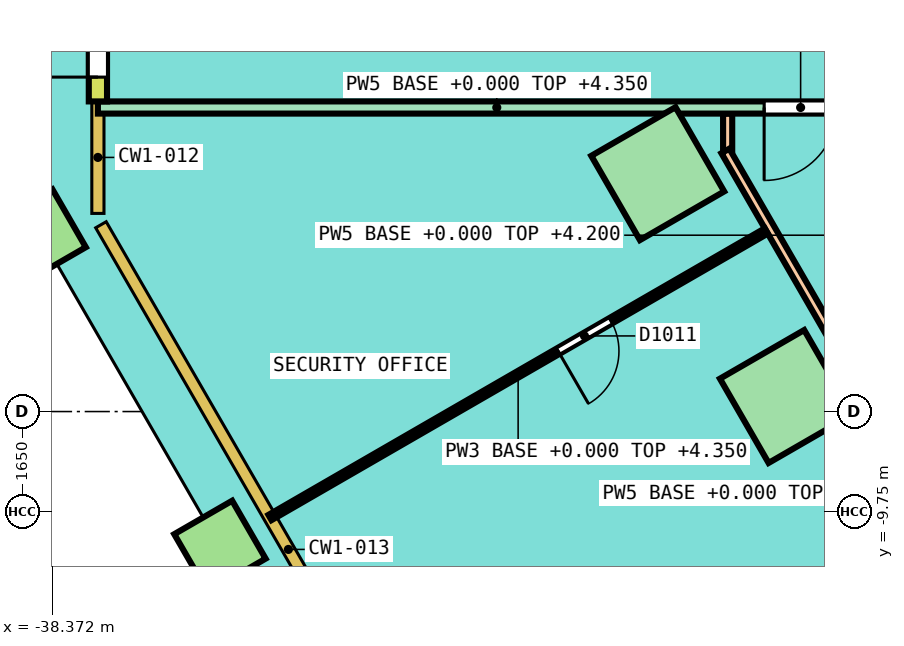
"""IFC4 building model, lengths in metres.
Left out: names, types, materials, properties, quantities, classifications, styles, units other than length and angle.
Written with IfcOpenShell. Run it as: python <this file> out.ifc"""

import sys

from ifc_helpers import new_model, si_unit, direction, frame, frame_2d, origin, origin_2d, place, context, subcontext, project, spatial, rectangle, extrude, element, fill, save


model = new_model("IFC4")
c1 = context("Model", 3, precision=1e-05, world=origin(), true_north=direction((0.0, 1.0)))
c2 = subcontext(c1, "Body", "Model", "MODEL_VIEW")
j1 = project(units=[si_unit("LENGTHUNIT", "METRE"), si_unit("PLANEANGLEUNIT", "RADIAN")], contexts=[c1])
p1 = place(None, origin())
s1 = spatial("IfcSite", under=j1, at=p1, CompositionType="ELEMENT")
p2 = place(p1, origin())
s2 = spatial("IfcBuilding", under=s1, at=p2, CompositionType="ELEMENT")
p3 = place(p2, origin())
s3 = spatial("IfcBuildingStorey", under=s2, at=p3, CompositionType="ELEMENT", Elevation=0.0)
for number, where, z_axis, x_axis in (
    (1, (-28.413, -4.188, 0.0), (0.0, 0.0, 1.0), (0.5, -0.866, 0.0)),
    (2, (-26.297, -7.853, 0.0), (0.0, 0.0, 1.0), (0.5, -0.866, 0.0)),
):
    element("IfcColumn", number, at=place(p3, frame(where, z_axis=z_axis, x_axis=x_axis)), inside=s3, PredefinedType="COLUMN", context=c2, shape_type="SweptSolid", body=[
        extrude(rectangle(XDim=1.6, YDim=1.6, at=origin_2d()), origin(), (0.0, 0.0, 1.0), 5.25),
    ])
for number, where, z_axis, x_axis in (
    (3, (-38.569, -5.196, -0.35), (0.0, 0.0, 1.0), (0.5, -0.866, 0.0)),
    (4, (-35.612, -10.318, -0.35), (0.0, 0.0, 1.0), (0.5, -0.866, 0.0)),
):
    element("IfcColumn", number, at=place(p3, frame(where, z_axis=z_axis, x_axis=x_axis)), inside=s3, PredefinedType="COLUMN", context=c2, shape_type="SweptSolid", body=[
        extrude(rectangle(XDim=1.1, YDim=1.1, at=origin_2d()), origin(), (0.0, 0.0, 1.0), 5.6),
    ])
p4 = place(p3, frame((-37.619, 3.0, 0.0), z_axis=(0.0, 0.0, 1.0), x_axis=(0.0, -1.0, 0.0)))
e5 = element("IfcWall", 5, at=p4, inside=s3, PredefinedType="SOLIDWALL", context=c2, shape_type="SweptSolid", body=[
    extrude(rectangle(XDim=6.0, YDim=0.3, at=frame_2d((3.0, 0.0))), origin(), (0.0, 0.0, 1.0), 5.25),
])
p5 = place(p4, frame((0.4, 0.0, 0.0)))
e6 = element("IfcOpeningElement", 6, at=p5, cuts=e5, PredefinedType="OPENING", context=c2, shape_type="SweptSolid", body=[
    extrude(rectangle(XDim=1.8, YDim=2.4, at=frame_2d((0.9, 1.2))), frame((0.0, 0.16, 0.0), z_axis=(0.0, -1.0, 0.0), x_axis=(1.0, 0.0, 0.0)), (0.0, 0.0, 1.0), 0.32),
])
p6 = place(p4, frame((3.8, 0.0, 0.0)))
e7 = element("IfcOpeningElement", 7, at=p6, cuts=e5, PredefinedType="OPENING", context=c2, shape_type="SweptSolid", body=[
    extrude(rectangle(XDim=1.8, YDim=2.4, at=frame_2d((0.9, 1.2))), frame((0.0, 0.16, 0.0), z_axis=(0.0, -1.0, 0.0), x_axis=(1.0, 0.0, 0.0)), (0.0, 0.0, 1.0), 0.32),
])
p7 = place(p3, frame((-27.263, -3.804, 0.0), z_axis=(0.0, 0.0, 1.0), x_axis=(0.0, 1.0, 0.0)))
e8 = element("IfcWall", 8, at=p7, inside=s3, PredefinedType="PARTITIONING", context=c2, shape_type="SweptSolid", body=[
    extrude(rectangle(XDim=0.604, YDim=0.15, at=frame_2d((0.302, 0.0))), origin(), (0.0, 0.0, 1.0), 4.2),
])
p8 = place(p3, frame((-27.3, -3.814, 0.0), z_axis=(0.0, 0.0, 1.0), x_axis=(0.499997805905, -0.866026670542, 0.0)))
e9 = element("IfcWall", 9, at=p8, inside=s3, PredefinedType="PARTITIONING", context=c2, shape_type="SweptSolid", body=[
    extrude(rectangle(XDim=20.543, YDim=0.15, at=frame_2d((10.272, 0.0))), origin(), (0.0, 0.0, 1.0), 4.2),
])
p9 = place(p8, frame((14.036, 0.0, 0.0)))
e10 = element("IfcOpeningElement", 10, at=p9, cuts=e9, PredefinedType="OPENING", context=c2, shape_type="SweptSolid", body=[
    extrude(rectangle(XDim=1.0, YDim=2.1, at=frame_2d((0.5, 1.05))), frame((0.0, 0.085, 0.0), z_axis=(0.0, -1.0, 0.0), x_axis=(1.0, 0.0, 0.0)), (0.0, 0.0, 1.0), 0.17),
])
p10 = place(p3, frame((-37.619, -3.1, 0.0), z_axis=(0.0, 0.0, 1.0), x_axis=(1.0, 0.0, 0.0)))
e11 = element("IfcWall", 11, at=p10, inside=s3, PredefinedType="PARTITIONING", context=c2, shape_type="SweptSolid", body=[
    extrude(rectangle(XDim=13.119, YDim=0.2, at=frame_2d((6.56, 0.0))), origin(), (0.0, 0.0, 1.0), 4.35),
])
p11 = place(p10, frame((10.956, 0.0, 0.0)))
e12 = element("IfcOpeningElement", 12, at=p11, cuts=e11, PredefinedType="OPENING", context=c2, shape_type="SweptSolid", body=[
    extrude(rectangle(XDim=1.2, YDim=2.1, at=frame_2d((0.6, 1.05))), frame((0.0, 0.11, 0.0), z_axis=(0.0, -1.0, 0.0), x_axis=(1.0, 0.0, 0.0)), (0.0, 0.0, 1.0), 0.22),
])
p12 = place(p3, frame((-34.79, -9.843, 0.0), z_axis=(0.0, 0.0, 1.0), x_axis=(0.866020373745, 0.500008712183, 0.0)))
e13 = element("IfcWall", 13, at=p12, inside=s3, PredefinedType="PARTITIONING", context=c2, shape_type="SweptSolid", body=[
    extrude(rectangle(XDim=9.425, YDim=0.1, at=frame_2d((4.712, 0.0))), origin(), (0.0, 0.0, 1.0), 4.35),
])
p13 = place(p12, frame((5.472, 0.0, 0.0)))
e14 = element("IfcOpeningElement", 14, at=p13, cuts=e13, PredefinedType="OPENING", context=c2, shape_type="SweptSolid", body=[
    extrude(rectangle(XDim=1.0, YDim=2.1, at=frame_2d((0.5, 1.05))), frame((0.0, 0.06, 0.0), z_axis=(0.0, -1.0, 0.0), x_axis=(1.0, 0.0, 0.0)), (0.0, 0.0, 1.0), 0.12),
])
p14 = place(p6, origin())
e15 = element("IfcDoor", 15, at=p14, inside=s3, OperationType="DOUBLE_DOOR_SINGLE_SWING", PredefinedType="DOOR", context=c2, shape_type="SweptSolid", body=[
    extrude(rectangle(XDim=1.8, YDim=2.4, at=frame_2d((0.9, 1.2))), frame((0.0, 0.025, 0.0), z_axis=(0.0, -1.0, 0.0), x_axis=(1.0, 0.0, 0.0)), (0.0, 0.0, 1.0), 0.05),
])
fill(e7, e15)
p15 = place(p13, origin())
e16 = element("IfcDoor", 16, at=p15, inside=s3, OperationType="SINGLE_SWING_RIGHT", PredefinedType="DOOR", context=c2, shape_type="SweptSolid", body=[
    extrude(rectangle(XDim=1.0, YDim=2.1, at=frame_2d((0.5, 1.05))), frame((0.0, 0.025, 0.0), z_axis=(0.0, -1.0, 0.0), x_axis=(1.0, 0.0, 0.0)), (0.0, 0.0, 1.0), 0.05),
])
fill(e14, e16)
p16 = place(p11, origin())
e17 = element("IfcDoor", 17, at=p16, inside=s3, OperationType="SINGLE_SWING_LEFT", PredefinedType="DOOR", context=c2, shape_type="SweptSolid", body=[
    extrude(rectangle(XDim=1.2, YDim=2.1, at=frame_2d((0.6, 1.05))), frame((0.0, 0.025, 0.0), z_axis=(0.0, -1.0, 0.0), x_axis=(1.0, 0.0, 0.0)), (0.0, 0.0, 1.0), 0.05),
])
fill(e12, e17)
save(model, sys.argv[1])
